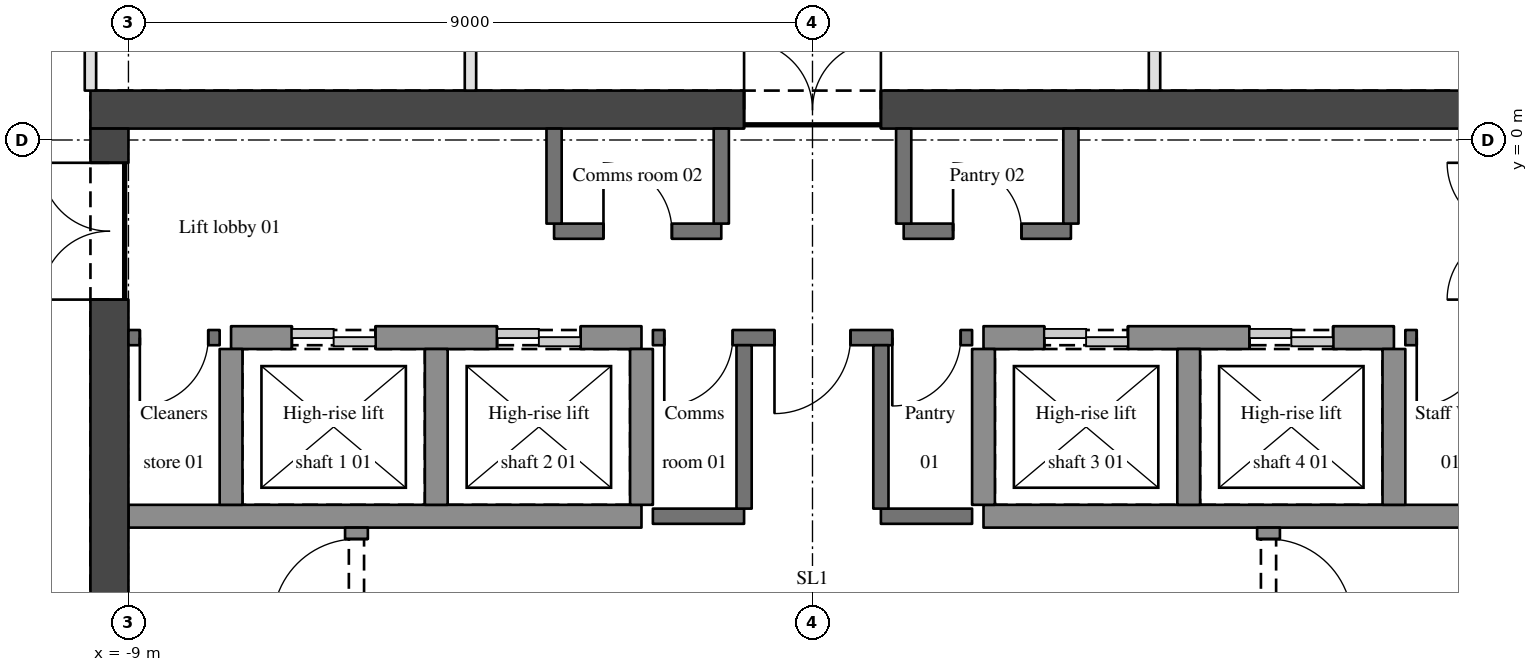
"""IFC4 building model, lengths in metres.
Left out: names, types, materials, properties, quantities, classifications, styles, units other than length and angle.
Written with IfcOpenShell. Run it as: python <this file> out.ifc"""

import sys

from ifc_helpers import new_model, si_unit, direction, frame, frame_2d, origin, place, context, subcontext, project, spatial, rectangle, extrude, element, fill, save


model = new_model("IFC4")
c1 = context("Model", 3, precision=1e-05, world=origin(), true_north=direction((0.0, 1.0)))
c2 = subcontext(c1, "Body", "Model", "MODEL_VIEW")
j1 = project(units=[si_unit("LENGTHUNIT", "METRE"), si_unit("PLANEANGLEUNIT", "RADIAN")], contexts=[c1])
p1 = place(None, origin())
s1 = spatial("IfcSite", under=j1, at=p1, CompositionType="ELEMENT")
p2 = place(p1, origin())
s2 = spatial("IfcBuilding", under=s1, at=p2, CompositionType="ELEMENT")
p3 = place(p2, frame((0.0, 0.0, 206.85)))
s3 = spatial("IfcBuildingStorey", under=s2, at=p3, CompositionType="ELEMENT", Elevation=206.85)
p4 = place(p3, frame((-9.5, 0.4, 0.0), z_axis=(0.0, 0.0, 1.0), x_axis=(1.0, 0.0, 0.0)))
e1 = element("IfcWall", 1, at=p4, inside=s3, PredefinedType="SHEAR", context=c2, shape_type="SweptSolid", body=[
    extrude(rectangle(XDim=19.0, YDim=0.5, at=frame_2d((9.5, 0.0))), origin(), (0.0, 0.0, 1.0), 3.15),
])
p5 = place(p4, frame((8.6, 0.0, 0.0)))
e2 = element("IfcOpeningElement", 2, at=p5, cuts=e1, PredefinedType="OPENING", context=c2, shape_type="SweptSolid", body=[
    extrude(rectangle(XDim=1.8, YDim=2.1, at=frame_2d((0.9, 1.05))), frame((0.0, 0.26, 0.0), z_axis=(0.0, -1.0, 0.0), x_axis=(1.0, 0.0, 0.0)), (0.0, 0.0, 1.0), 0.52),
])
p6 = place(p3, frame((-9.25, -11.5, 0.0), z_axis=(0.0, 0.0, 1.0), x_axis=(0.0, 1.0, 0.0)))
e3 = element("IfcWall", 3, at=p6, inside=s3, PredefinedType="SHEAR", context=c2, shape_type="SweptSolid", body=[
    extrude(rectangle(XDim=11.65, YDim=0.5, at=frame_2d((5.825, 0.0))), origin(), (0.0, 0.0, 1.0), 3.15),
])
p7 = place(p6, frame((9.4, 0.0, 0.0)))
e4 = element("IfcOpeningElement", 4, at=p7, cuts=e3, PredefinedType="OPENING", context=c2, shape_type="SweptSolid", body=[
    extrude(rectangle(XDim=1.8, YDim=2.1, at=frame_2d((0.9, 1.05))), frame((0.0, 0.26, 0.0), z_axis=(0.0, -1.0, 0.0), x_axis=(1.0, 0.0, 0.0)), (0.0, 0.0, 1.0), 0.52),
])
p8 = place(p3, frame((-9.0, -4.95, 0.0), z_axis=(0.0, 0.0, 1.0), x_axis=(1.0, 0.0, 0.0)))
e5 = element("IfcWall", 5, at=p8, inside=s3, PredefinedType="SHEAR", context=c2, shape_type="SweptSolid", body=[
    extrude(rectangle(XDim=6.75, YDim=0.3, at=frame_2d((3.375, 0.0))), origin(), (0.0, 0.0, 1.0), 3.15),
])
for number, where, z_axis, x_axis in (
    (6, (-2.1, -4.95, 0.0), (0.0, 0.0, 1.0), (1.0, 0.0, 0.0)),
    (7, (0.9, -4.95, 0.0), (0.0, 0.0, 1.0), (1.0, 0.0, 0.0)),
):
    element("IfcWall", number, at=place(p3, frame(where, z_axis=z_axis, x_axis=x_axis)), inside=s3, PredefinedType="SOLIDWALL", context=c2, shape_type="SweptSolid", body=[
        extrude(rectangle(XDim=1.2, YDim=0.2, at=frame_2d((0.6, 0.0))), origin(), (0.0, 0.0, 1.0), 2.85),
    ])
p9 = place(p3, frame((2.25, -4.95, 0.0), z_axis=(0.0, 0.0, 1.0), x_axis=(1.0, 0.0, 0.0)))
e8 = element("IfcWall", 8, at=p9, inside=s3, PredefinedType="SHEAR", context=c2, shape_type="SweptSolid", body=[
    extrude(rectangle(XDim=6.75, YDim=0.3, at=frame_2d((3.375, 0.0))), origin(), (0.0, 0.0, 1.0), 3.15),
])
p10 = place(p3, frame((-7.8, -2.6, 0.0), z_axis=(0.0, 0.0, 1.0), x_axis=(-1.0, 0.0, 0.0)))
e9 = element("IfcWall", 9, at=p10, inside=s3, PredefinedType="SOLIDWALL", context=c2, shape_type="SweptSolid", body=[
    extrude(rectangle(XDim=1.2, YDim=0.2, at=frame_2d((0.6, 0.0))), origin(), (0.0, 0.0, 1.0), 2.85),
])
p11 = place(p10, frame((0.15, 0.0, 0.0)))
e10 = element("IfcOpeningElement", 10, at=p11, cuts=e9, PredefinedType="OPENING", context=c2, shape_type="SweptSolid", body=[
    extrude(rectangle(XDim=0.9, YDim=2.1, at=frame_2d((0.45, 1.05))), frame((0.0, 0.11, 0.0), z_axis=(0.0, -1.0, 0.0), x_axis=(1.0, 0.0, 0.0)), (0.0, 0.0, 1.0), 0.22),
])
p12 = place(p3, frame((-7.65, -2.6, 0.0), z_axis=(0.0, 0.0, 1.0), x_axis=(1.0, 0.0, 0.0)))
e11 = element("IfcWall", 11, at=p12, inside=s3, PredefinedType="SHEAR", context=c2, shape_type="SweptSolid", body=[
    extrude(rectangle(XDim=5.4, YDim=0.3, at=frame_2d((2.7, 0.0))), origin(), (0.0, 0.0, 1.0), 3.15),
])
p13 = place(p12, frame((0.8, 0.0, 0.0)))
e12 = element("IfcOpeningElement", 12, at=p13, cuts=e11, PredefinedType="OPENING", context=c2, shape_type="SweptSolid", body=[
    extrude(rectangle(XDim=1.1, YDim=2.1, at=frame_2d((0.55, 1.05))), frame((0.0, 0.16, 0.0), z_axis=(0.0, -1.0, 0.0), x_axis=(1.0, 0.0, 0.0)), (0.0, 0.0, 1.0), 0.32),
])
p14 = place(p12, frame((3.5, 0.0, 0.0)))
e13 = element("IfcOpeningElement", 13, at=p14, cuts=e11, PredefinedType="OPENING", context=c2, shape_type="SweptSolid", body=[
    extrude(rectangle(XDim=1.1, YDim=2.1, at=frame_2d((0.55, 1.05))), frame((0.0, 0.16, 0.0), z_axis=(0.0, -1.0, 0.0), x_axis=(1.0, 0.0, 0.0)), (0.0, 0.0, 1.0), 0.32),
])
p15 = place(p3, frame((2.1, -2.6, 0.0), z_axis=(0.0, 0.0, 1.0), x_axis=(-1.0, 0.0, 0.0)))
e14 = element("IfcWall", 14, at=p15, inside=s3, PredefinedType="SOLIDWALL", context=c2, shape_type="SweptSolid", body=[
    extrude(rectangle(XDim=4.2, YDim=0.2, at=frame_2d((2.1, 0.0))), origin(), (0.0, 0.0, 1.0), 2.85),
])
p16 = place(p15, frame((1.6, 0.0, 0.0)))
e15 = element("IfcOpeningElement", 15, at=p16, cuts=e14, PredefinedType="OPENING", context=c2, shape_type="SweptSolid", body=[
    extrude(rectangle(XDim=1.0, YDim=2.1, at=frame_2d((0.5, 1.05))), frame((0.0, 0.11, 0.0), z_axis=(0.0, -1.0, 0.0), x_axis=(1.0, 0.0, 0.0)), (0.0, 0.0, 1.0), 0.22),
])
p17 = place(p15, frame((3.15, 0.0, 0.0)))
e16 = element("IfcOpeningElement", 16, at=p17, cuts=e14, PredefinedType="OPENING", context=c2, shape_type="SweptSolid", body=[
    extrude(rectangle(XDim=0.9, YDim=2.1, at=frame_2d((0.45, 1.05))), frame((0.0, 0.11, 0.0), z_axis=(0.0, -1.0, 0.0), x_axis=(1.0, 0.0, 0.0)), (0.0, 0.0, 1.0), 0.22),
])
p18 = place(p15, frame((0.15, 0.0, 0.0)))
e17 = element("IfcOpeningElement", 17, at=p18, cuts=e14, PredefinedType="OPENING", context=c2, shape_type="SweptSolid", body=[
    extrude(rectangle(XDim=0.9, YDim=2.1, at=frame_2d((0.45, 1.05))), frame((0.0, 0.11, 0.0), z_axis=(0.0, -1.0, 0.0), x_axis=(1.0, 0.0, 0.0)), (0.0, 0.0, 1.0), 0.22),
])
p19 = place(p3, frame((2.25, -2.6, 0.0), z_axis=(0.0, 0.0, 1.0), x_axis=(1.0, 0.0, 0.0)))
e18 = element("IfcWall", 18, at=p19, inside=s3, PredefinedType="SHEAR", context=c2, shape_type="SweptSolid", body=[
    extrude(rectangle(XDim=5.4, YDim=0.3, at=frame_2d((2.7, 0.0))), origin(), (0.0, 0.0, 1.0), 3.15),
])
p20 = place(p19, frame((0.8, 0.0, 0.0)))
e19 = element("IfcOpeningElement", 19, at=p20, cuts=e18, PredefinedType="OPENING", context=c2, shape_type="SweptSolid", body=[
    extrude(rectangle(XDim=1.1, YDim=2.1, at=frame_2d((0.55, 1.05))), frame((0.0, 0.16, 0.0), z_axis=(0.0, -1.0, 0.0), x_axis=(1.0, 0.0, 0.0)), (0.0, 0.0, 1.0), 0.32),
])
p21 = place(p19, frame((3.5, 0.0, 0.0)))
e20 = element("IfcOpeningElement", 20, at=p21, cuts=e18, PredefinedType="OPENING", context=c2, shape_type="SweptSolid", body=[
    extrude(rectangle(XDim=1.1, YDim=2.1, at=frame_2d((0.55, 1.05))), frame((0.0, 0.16, 0.0), z_axis=(0.0, -1.0, 0.0), x_axis=(1.0, 0.0, 0.0)), (0.0, 0.0, 1.0), 0.32),
])
p22 = place(p3, frame((9.0, -2.6, 0.0), z_axis=(0.0, 0.0, 1.0), x_axis=(-1.0, 0.0, 0.0)))
e21 = element("IfcWall", 21, at=p22, inside=s3, PredefinedType="SOLIDWALL", context=c2, shape_type="SweptSolid", body=[
    extrude(rectangle(XDim=1.2, YDim=0.2, at=frame_2d((0.6, 0.0))), origin(), (0.0, 0.0, 1.0), 2.85),
])
p23 = place(p22, frame((0.15, 0.0, 0.0)))
e22 = element("IfcOpeningElement", 22, at=p23, cuts=e21, PredefinedType="OPENING", context=c2, shape_type="SweptSolid", body=[
    extrude(rectangle(XDim=0.9, YDim=2.1, at=frame_2d((0.45, 1.05))), frame((0.0, 0.11, 0.0), z_axis=(0.0, -1.0, 0.0), x_axis=(1.0, 0.0, 0.0)), (0.0, 0.0, 1.0), 0.22),
])
p24 = place(p3, frame((-3.4, -1.2, 0.0), z_axis=(0.0, 0.0, 1.0), x_axis=(1.0, 0.0, 0.0)))
e23 = element("IfcWall", 23, at=p24, inside=s3, PredefinedType="SOLIDWALL", context=c2, shape_type="SweptSolid", body=[
    extrude(rectangle(XDim=2.2, YDim=0.2, at=frame_2d((1.1, 0.0))), origin(), (0.0, 0.0, 1.0), 2.85),
])
p25 = place(p24, frame((0.65, 0.0, 0.0)))
e24 = element("IfcOpeningElement", 24, at=p25, cuts=e23, PredefinedType="OPENING", context=c2, shape_type="SweptSolid", body=[
    extrude(rectangle(XDim=0.9, YDim=2.1, at=frame_2d((0.45, 1.05))), frame((0.0, 0.11, 0.0), z_axis=(0.0, -1.0, 0.0), x_axis=(1.0, 0.0, 0.0)), (0.0, 0.0, 1.0), 0.22),
])
p26 = place(p3, frame((1.2, -1.2, 0.0), z_axis=(0.0, 0.0, 1.0), x_axis=(1.0, 0.0, 0.0)))
e25 = element("IfcWall", 25, at=p26, inside=s3, PredefinedType="SOLIDWALL", context=c2, shape_type="SweptSolid", body=[
    extrude(rectangle(XDim=2.2, YDim=0.2, at=frame_2d((1.1, 0.0))), origin(), (0.0, 0.0, 1.0), 2.85),
])
p27 = place(p26, frame((0.65, 0.0, 0.0)))
e26 = element("IfcOpeningElement", 26, at=p27, cuts=e25, PredefinedType="OPENING", context=c2, shape_type="SweptSolid", body=[
    extrude(rectangle(XDim=0.9, YDim=2.1, at=frame_2d((0.45, 1.05))), frame((0.0, 0.11, 0.0), z_axis=(0.0, -1.0, 0.0), x_axis=(1.0, 0.0, 0.0)), (0.0, 0.0, 1.0), 0.22),
])
p28 = place(p3, frame((-9.5, 9.5, 0.0), z_axis=(0.0, 0.0, 1.0), x_axis=(0.0, -1.0, 0.0)))
e27 = element("IfcWall", 27, at=p28, inside=s3, PredefinedType="PARTITIONING", context=c2, shape_type="SweptSolid", body=[
    extrude(rectangle(XDim=8.85, YDim=0.15, at=frame_2d((4.425, 0.0))), origin(), (0.0, 0.0, 1.0), 2.21),
])
p29 = place(p28, frame((6.025, 0.0, 0.0)))
e28 = element("IfcOpeningElement", 28, at=p29, cuts=e27, PredefinedType="OPENING", context=c2, shape_type="SweptSolid", body=[
    extrude(rectangle(XDim=0.9, YDim=2.1, at=frame_2d((0.45, 1.05))), frame((0.0, 0.085, 0.0), z_axis=(0.0, -1.0, 0.0), x_axis=(1.0, 0.0, 0.0)), (0.0, 0.0, 1.0), 0.17),
])
p30 = place(p3, frame((-7.65, -4.8, 0.0), z_axis=(0.0, 0.0, 1.0), x_axis=(0.0, 1.0, 0.0)))
e29 = element("IfcWall", 29, at=p30, inside=s3, PredefinedType="SHEAR", context=c2, shape_type="SweptSolid", body=[
    extrude(rectangle(XDim=2.05, YDim=0.3, at=frame_2d((1.025, 0.0))), origin(), (0.0, 0.0, 1.0), 3.15),
])
p31 = place(p3, frame((-6.0, -11.5, 0.0), z_axis=(0.0, 0.0, 1.0), x_axis=(0.0, 1.0, 0.0)))
e30 = element("IfcWall", 30, at=p31, inside=s3, PredefinedType="SHEAR", context=c2, shape_type="SweptSolid", body=[
    extrude(rectangle(XDim=6.4, YDim=0.3, at=frame_2d((3.2, 0.0))), origin(), (0.0, 0.0, 1.0), 3.15),
])
p32 = place(p31, frame((5.15, 0.0, 0.0)))
e31 = element("IfcOpeningElement", 31, at=p32, cuts=e30, PredefinedType="OPENING", context=c2, shape_type="SweptSolid", body=[
    extrude(rectangle(XDim=1.1, YDim=2.1, at=frame_2d((0.55, 1.05))), frame((0.0, 0.16, 0.0), z_axis=(0.0, -1.0, 0.0), x_axis=(1.0, 0.0, 0.0)), (0.0, 0.0, 1.0), 0.32),
])
p33 = place(p3, frame((-4.95, -4.8, 0.0), z_axis=(0.0, 0.0, 1.0), x_axis=(0.0, 1.0, 0.0)))
e32 = element("IfcWall", 32, at=p33, inside=s3, PredefinedType="SHEAR", context=c2, shape_type="SweptSolid", body=[
    extrude(rectangle(XDim=2.05, YDim=0.3, at=frame_2d((1.025, 0.0))), origin(), (0.0, 0.0, 1.0), 3.15),
])
p34 = place(p3, frame((-4.5, 0.65, 0.0), z_axis=(0.0, 0.0, 1.0), x_axis=(0.0, 1.0, 0.0)))
e33 = element("IfcWall", 33, at=p34, inside=s3, PredefinedType="PARTITIONING", context=c2, shape_type="SweptSolid", body=[
    extrude(rectangle(XDim=4.65, YDim=0.15, at=frame_2d((2.325, 0.0))), origin(), (0.0, 0.0, 1.0), 2.21),
])
p35 = place(p3, frame((-3.4, -1.1, 0.0), z_axis=(0.0, 0.0, 1.0), x_axis=(0.0, 1.0, 0.0)))
e34 = element("IfcWall", 34, at=p35, inside=s3, PredefinedType="SOLIDWALL", context=c2, shape_type="SweptSolid", body=[
    extrude(rectangle(XDim=1.25, YDim=0.2, at=frame_2d((0.625, 0.0))), origin(), (0.0, 0.0, 1.0), 2.85),
])
p36 = place(p3, frame((-2.25, -4.8, 0.0), z_axis=(0.0, 0.0, 1.0), x_axis=(0.0, 1.0, 0.0)))
e35 = element("IfcWall", 35, at=p36, inside=s3, PredefinedType="SHEAR", context=c2, shape_type="SweptSolid", body=[
    extrude(rectangle(XDim=2.05, YDim=0.3, at=frame_2d((1.025, 0.0))), origin(), (0.0, 0.0, 1.0), 3.15),
])
p37 = place(p3, frame((-1.2, -1.1, 0.0), z_axis=(0.0, 0.0, 1.0), x_axis=(0.0, 1.0, 0.0)))
e36 = element("IfcWall", 36, at=p37, inside=s3, PredefinedType="SOLIDWALL", context=c2, shape_type="SweptSolid", body=[
    extrude(rectangle(XDim=1.25, YDim=0.2, at=frame_2d((0.625, 0.0))), origin(), (0.0, 0.0, 1.0), 2.85),
])
for number, where, z_axis, x_axis in (
    (37, (-0.9, -4.85, 0.0), (0.0, 0.0, 1.0), (0.0, 1.0, 0.0)),
    (38, (0.9, -4.85, 0.0), (0.0, 0.0, 1.0), (0.0, 1.0, 0.0)),
):
    element("IfcWall", number, at=place(p3, frame(where, z_axis=z_axis, x_axis=x_axis)), inside=s3, PredefinedType="SOLIDWALL", context=c2, shape_type="SweptSolid", body=[
        extrude(rectangle(XDim=2.15, YDim=0.2, at=frame_2d((1.075, 0.0))), origin(), (0.0, 0.0, 1.0), 2.85),
    ])
p38 = place(p3, frame((1.2, -1.1, 0.0), z_axis=(0.0, 0.0, 1.0), x_axis=(0.0, 1.0, 0.0)))
e39 = element("IfcWall", 39, at=p38, inside=s3, PredefinedType="SOLIDWALL", context=c2, shape_type="SweptSolid", body=[
    extrude(rectangle(XDim=1.25, YDim=0.2, at=frame_2d((0.625, 0.0))), origin(), (0.0, 0.0, 1.0), 2.85),
])
p39 = place(p3, frame((2.25, -4.8, 0.0), z_axis=(0.0, 0.0, 1.0), x_axis=(0.0, 1.0, 0.0)))
e40 = element("IfcWall", 40, at=p39, inside=s3, PredefinedType="SHEAR", context=c2, shape_type="SweptSolid", body=[
    extrude(rectangle(XDim=2.05, YDim=0.3, at=frame_2d((1.025, 0.0))), origin(), (0.0, 0.0, 1.0), 3.15),
])
p40 = place(p3, frame((3.4, -1.1, 0.0), z_axis=(0.0, 0.0, 1.0), x_axis=(0.0, 1.0, 0.0)))
e41 = element("IfcWall", 41, at=p40, inside=s3, PredefinedType="SOLIDWALL", context=c2, shape_type="SweptSolid", body=[
    extrude(rectangle(XDim=1.25, YDim=0.2, at=frame_2d((0.625, 0.0))), origin(), (0.0, 0.0, 1.0), 2.85),
])
p41 = place(p3, frame((4.5, 0.65, 0.0), z_axis=(0.0, 0.0, 1.0), x_axis=(0.0, 1.0, 0.0)))
e42 = element("IfcWall", 42, at=p41, inside=s3, PredefinedType="PARTITIONING", context=c2, shape_type="SweptSolid", body=[
    extrude(rectangle(XDim=4.675, YDim=0.15, at=frame_2d((2.337, 0.0))), origin(), (0.0, 0.0, 1.0), 2.21),
])
p42 = place(p3, frame((4.95, -4.8, 0.0), z_axis=(0.0, 0.0, 1.0), x_axis=(0.0, 1.0, 0.0)))
e43 = element("IfcWall", 43, at=p42, inside=s3, PredefinedType="SHEAR", context=c2, shape_type="SweptSolid", body=[
    extrude(rectangle(XDim=2.05, YDim=0.3, at=frame_2d((1.025, 0.0))), origin(), (0.0, 0.0, 1.0), 3.15),
])
p43 = place(p3, frame((6.0, -5.1, 0.0), z_axis=(0.0, 0.0, 1.0), x_axis=(0.0, -1.0, 0.0)))
e44 = element("IfcWall", 44, at=p43, inside=s3, PredefinedType="SHEAR", context=c2, shape_type="SweptSolid", body=[
    extrude(rectangle(XDim=6.4, YDim=0.3, at=frame_2d((3.2, 0.0))), origin(), (0.0, 0.0, 1.0), 3.15),
])
p44 = place(p43, frame((0.15, 0.0, 0.0)))
e45 = element("IfcOpeningElement", 45, at=p44, cuts=e44, PredefinedType="OPENING", context=c2, shape_type="SweptSolid", body=[
    extrude(rectangle(XDim=1.1, YDim=2.1, at=frame_2d((0.55, 1.05))), frame((0.0, 0.16, 0.0), z_axis=(0.0, -1.0, 0.0), x_axis=(1.0, 0.0, 0.0)), (0.0, 0.0, 1.0), 0.32),
])
p45 = place(p3, frame((7.65, -4.8, 0.0), z_axis=(0.0, 0.0, 1.0), x_axis=(0.0, 1.0, 0.0)))
e46 = element("IfcWall", 46, at=p45, inside=s3, PredefinedType="SHEAR", context=c2, shape_type="SweptSolid", body=[
    extrude(rectangle(XDim=2.05, YDim=0.3, at=frame_2d((1.025, 0.0))), origin(), (0.0, 0.0, 1.0), 3.15),
])
p46 = place(p7, origin())
e47 = element("IfcDoor", 47, at=p46, inside=s3, OperationType="DOUBLE_DOOR_SINGLE_SWING", PredefinedType="DOOR", context=c2, shape_type="SweptSolid", body=[
    extrude(rectangle(XDim=1.8, YDim=2.1, at=frame_2d((0.9, 1.05))), frame((0.0, 0.025, 0.0), z_axis=(0.0, -1.0, 0.0), x_axis=(1.0, 0.0, 0.0)), (0.0, 0.0, 1.0), 0.05),
])
fill(e4, e47)
p47 = place(p5, origin())
e48 = element("IfcDoor", 48, at=p47, inside=s3, OperationType="DOUBLE_DOOR_SINGLE_SWING", PredefinedType="DOOR", context=c2, shape_type="SweptSolid", body=[
    extrude(rectangle(XDim=1.8, YDim=2.1, at=frame_2d((0.9, 1.05))), frame((0.0, 0.025, 0.0), z_axis=(0.0, -1.0, 0.0), x_axis=(1.0, 0.0, 0.0)), (0.0, 0.0, 1.0), 0.05),
])
fill(e2, e48)
p48 = place(p16, origin())
e49 = element("IfcDoor", 49, at=p48, inside=s3, OperationType="SINGLE_SWING_RIGHT", PredefinedType="DOOR", context=c2, shape_type="SweptSolid", body=[
    extrude(rectangle(XDim=1.0, YDim=2.1, at=frame_2d((0.5, 1.05))), frame((0.0, 0.025, 0.0), z_axis=(0.0, -1.0, 0.0), x_axis=(1.0, 0.0, 0.0)), (0.0, 0.0, 1.0), 0.05),
])
fill(e15, e49)
p49 = place(p32, origin())
e50 = element("IfcDoor", 50, at=p49, inside=s3, OperationType="SINGLE_SWING_LEFT", PredefinedType="DOOR", context=c2, shape_type="SweptSolid", body=[
    extrude(rectangle(XDim=1.1, YDim=2.1, at=frame_2d((0.55, 1.05))), frame((0.0, 0.025, 0.0), z_axis=(0.0, -1.0, 0.0), x_axis=(1.0, 0.0, 0.0)), (0.0, 0.0, 1.0), 0.05),
])
fill(e31, e50)
p50 = place(p44, origin())
e51 = element("IfcDoor", 51, at=p50, inside=s3, OperationType="SINGLE_SWING_RIGHT", PredefinedType="DOOR", context=c2, shape_type="SweptSolid", body=[
    extrude(rectangle(XDim=1.1, YDim=2.1, at=frame_2d((0.55, 1.05))), frame((0.0, 0.025, 0.0), z_axis=(0.0, -1.0, 0.0), x_axis=(1.0, 0.0, 0.0)), (0.0, 0.0, 1.0), 0.05),
])
fill(e45, e51)
p51 = place(p17, origin())
e52 = element("IfcDoor", 52, at=p51, inside=s3, OperationType="SINGLE_SWING_RIGHT", PredefinedType="DOOR", context=c2, shape_type="SweptSolid", body=[
    extrude(rectangle(XDim=0.9, YDim=2.1, at=frame_2d((0.45, 1.05))), frame((0.0, 0.025, 0.0), z_axis=(0.0, -1.0, 0.0), x_axis=(1.0, 0.0, 0.0)), (0.0, 0.0, 1.0), 0.05),
])
fill(e16, e52)
p52 = place(p18, origin())
e53 = element("IfcDoor", 53, at=p52, inside=s3, OperationType="SINGLE_SWING_RIGHT", PredefinedType="DOOR", context=c2, shape_type="SweptSolid", body=[
    extrude(rectangle(XDim=0.9, YDim=2.1, at=frame_2d((0.45, 1.05))), frame((0.0, 0.025, 0.0), z_axis=(0.0, -1.0, 0.0), x_axis=(1.0, 0.0, 0.0)), (0.0, 0.0, 1.0), 0.05),
])
fill(e17, e53)
p53 = place(p23, origin())
e54 = element("IfcDoor", 54, at=p53, inside=s3, OperationType="SINGLE_SWING_RIGHT", PredefinedType="DOOR", context=c2, shape_type="SweptSolid", body=[
    extrude(rectangle(XDim=0.9, YDim=2.1, at=frame_2d((0.45, 1.05))), frame((0.0, 0.025, 0.0), z_axis=(0.0, -1.0, 0.0), x_axis=(1.0, 0.0, 0.0)), (0.0, 0.0, 1.0), 0.05),
])
fill(e22, e54)
p54 = place(p11, origin())
e55 = element("IfcDoor", 55, at=p54, inside=s3, OperationType="SINGLE_SWING_RIGHT", PredefinedType="DOOR", context=c2, shape_type="SweptSolid", body=[
    extrude(rectangle(XDim=0.9, YDim=2.1, at=frame_2d((0.45, 1.05))), frame((0.0, 0.025, 0.0), z_axis=(0.0, -1.0, 0.0), x_axis=(1.0, 0.0, 0.0)), (0.0, 0.0, 1.0), 0.05),
])
fill(e10, e55)
p55 = place(p25, origin())
e56 = element("IfcDoor", 56, at=p55, inside=s3, OperationType="SINGLE_SWING_LEFT", PredefinedType="DOOR", context=c2, shape_type="SweptSolid", body=[
    extrude(rectangle(XDim=0.9, YDim=2.1, at=frame_2d((0.45, 1.05))), frame((0.0, 0.025, 0.0), z_axis=(0.0, -1.0, 0.0), x_axis=(1.0, 0.0, 0.0)), (0.0, 0.0, 1.0), 0.05),
])
fill(e24, e56)
p56 = place(p27, origin())
e57 = element("IfcDoor", 57, at=p56, inside=s3, OperationType="SINGLE_SWING_LEFT", PredefinedType="DOOR", context=c2, shape_type="SweptSolid", body=[
    extrude(rectangle(XDim=0.9, YDim=2.1, at=frame_2d((0.45, 1.05))), frame((0.0, 0.025, 0.0), z_axis=(0.0, -1.0, 0.0), x_axis=(1.0, 0.0, 0.0)), (0.0, 0.0, 1.0), 0.05),
])
fill(e26, e57)
p57 = place(p13, origin())
e58 = element("IfcDoor", 58, at=p57, inside=s3, OperationType="DOUBLE_DOOR_SLIDING", PredefinedType="DOOR", context=c2, shape_type="SweptSolid", body=[
    extrude(rectangle(XDim=1.1, YDim=2.1, at=frame_2d((0.55, 1.05))), frame((0.0, 0.025, 0.0), z_axis=(0.0, -1.0, 0.0), x_axis=(1.0, 0.0, 0.0)), (0.0, 0.0, 1.0), 0.05),
])
fill(e12, e58)
p58 = place(p14, origin())
e59 = element("IfcDoor", 59, at=p58, inside=s3, OperationType="DOUBLE_DOOR_SLIDING", PredefinedType="DOOR", context=c2, shape_type="SweptSolid", body=[
    extrude(rectangle(XDim=1.1, YDim=2.1, at=frame_2d((0.55, 1.05))), frame((0.0, 0.025, 0.0), z_axis=(0.0, -1.0, 0.0), x_axis=(1.0, 0.0, 0.0)), (0.0, 0.0, 1.0), 0.05),
])
fill(e13, e59)
p59 = place(p20, origin())
e60 = element("IfcDoor", 60, at=p59, inside=s3, OperationType="DOUBLE_DOOR_SLIDING", PredefinedType="DOOR", context=c2, shape_type="SweptSolid", body=[
    extrude(rectangle(XDim=1.1, YDim=2.1, at=frame_2d((0.55, 1.05))), frame((0.0, 0.025, 0.0), z_axis=(0.0, -1.0, 0.0), x_axis=(1.0, 0.0, 0.0)), (0.0, 0.0, 1.0), 0.05),
])
fill(e19, e60)
p60 = place(p21, origin())
e61 = element("IfcDoor", 61, at=p60, inside=s3, OperationType="DOUBLE_DOOR_SLIDING", PredefinedType="DOOR", context=c2, shape_type="SweptSolid", body=[
    extrude(rectangle(XDim=1.1, YDim=2.1, at=frame_2d((0.55, 1.05))), frame((0.0, 0.025, 0.0), z_axis=(0.0, -1.0, 0.0), x_axis=(1.0, 0.0, 0.0)), (0.0, 0.0, 1.0), 0.05),
])
fill(e20, e61)
save(model, sys.argv[1])
